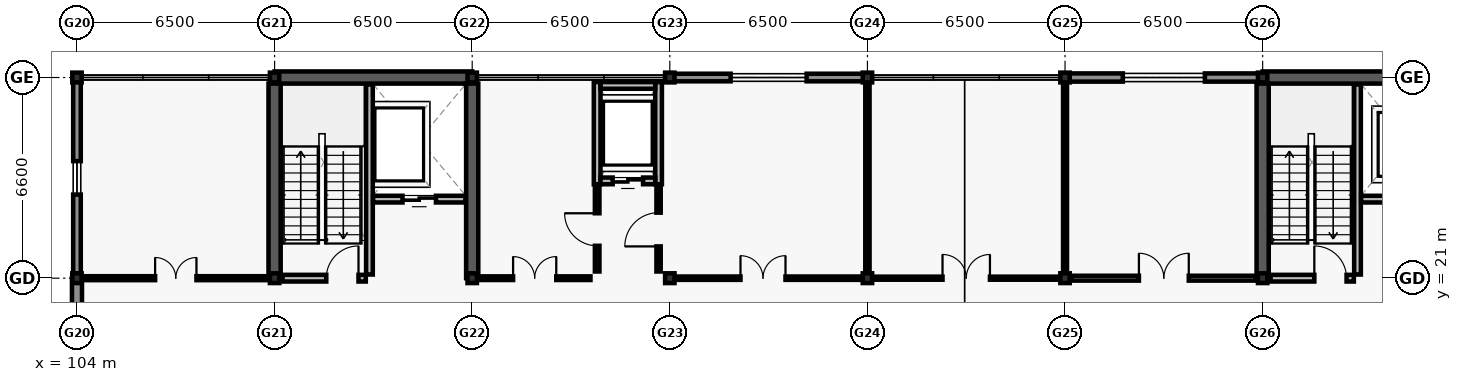
"""IFC4 building model, lengths in metres.
Left out: names, types, materials, properties, quantities, classifications, styles, units other than length and angle.
Written with IfcOpenShell. Run it as: python <this file> out.ifc"""

import sys

from ifc_helpers import new_model, si_unit, direction, frame, frame_2d, origin, origin_2d, place, context, subcontext, project, spatial, rectangle, i_section, extrude, element, fill, save


model = new_model("IFC4")
c1 = context("Model", 3, precision=1e-05, world=origin(), true_north=direction((0.0, 1.0)))
c2 = subcontext(c1, "Body", "Model", "MODEL_VIEW")
j1 = project(units=[si_unit("LENGTHUNIT", "METRE"), si_unit("PLANEANGLEUNIT", "RADIAN")], contexts=[c1])
p1 = place(None, origin())
s1 = spatial("IfcSite", under=j1, at=p1, CompositionType="ELEMENT")
p2 = place(p1, origin())
s2 = spatial("IfcBuilding", under=s1, at=p2, CompositionType="ELEMENT")
p3 = place(p2, frame((0.0, 0.0, 9.6)))
s3 = spatial("IfcBuildingStorey", under=s2, at=p3, CompositionType="ELEMENT", Elevation=9.6)
for number, where, z_axis, x_axis in (
    (1, (104.0, 21.0, 0.0), (0.0, 0.0, 1.0), (1.0, 0.0, 0.0)),
    (2, (104.0, 27.6, 0.0), (0.0, 0.0, 1.0), (1.0, 0.0, 0.0)),
    (3, (110.5, 21.0, 0.0), (0.0, 0.0, 1.0), (1.0, 0.0, 0.0)),
    (4, (110.5, 27.6, 0.0), (0.0, 0.0, 1.0), (1.0, 0.0, 0.0)),
    (5, (117.0, 21.0, 0.0), (0.0, 0.0, 1.0), (1.0, 0.0, 0.0)),
    (6, (117.0, 27.6, 0.0), (0.0, 0.0, 1.0), (1.0, 0.0, 0.0)),
    (7, (123.5, 21.0, 0.0), (0.0, 0.0, 1.0), (1.0, 0.0, 0.0)),
    (8, (123.5, 27.6, 0.0), (0.0, 0.0, 1.0), (1.0, 0.0, 0.0)),
    (9, (130.0, 21.0, 0.0), (0.0, 0.0, 1.0), (1.0, 0.0, 0.0)),
    (10, (130.0, 27.6, 0.0), (0.0, 0.0, 1.0), (1.0, 0.0, 0.0)),
    (11, (136.5, 21.0, 0.0), (0.0, 0.0, 1.0), (1.0, 0.0, 0.0)),
    (12, (136.5, 27.6, 0.0), (0.0, 0.0, 1.0), (1.0, 0.0, 0.0)),
    (13, (143.0, 21.0, 0.0), (0.0, 0.0, 1.0), (1.0, 0.0, 0.0)),
    (14, (143.0, 27.6, 0.0), (0.0, 0.0, 1.0), (1.0, 0.0, 0.0)),
):
    element("IfcColumn", number, at=place(p3, frame(where, z_axis=z_axis, x_axis=x_axis)), inside=s3, PredefinedType="COLUMN", context=c2, shape_type="SweptSolid", body=[
        extrude(i_section(OverallWidth=0.309, OverallDepth=0.321, WebThickness=0.014, FlangeThickness=0.022, FilletRadius=0.017, at=origin_2d()), origin(), (0.0, 0.0, 1.0), 3.9),
    ])
p4 = place(p3, frame((110.5, 27.6, 0.0), z_axis=(0.0, 0.0, 1.0), x_axis=(1.0, 0.0, 0.0)))
e15 = element("IfcWall", 15, at=p4, inside=s3, PredefinedType="SHEAR", context=c2, shape_type="SweptSolid", body=[
    extrude(rectangle(XDim=6.5, YDim=0.4, at=frame_2d((3.25, 0.0))), origin(), (0.0, 0.0, 1.0), 3.66),
])
for number, where, z_axis, x_axis in (
    (16, (110.5, 21.0, 0.0), (0.0, 0.0, 1.0), (0.0, 1.0, 0.0)),
    (17, (117.0, 21.0, 0.0), (0.0, 0.0, 1.0), (0.0, 1.0, 0.0)),
):
    element("IfcWall", number, at=place(p3, frame(where, z_axis=z_axis, x_axis=x_axis)), inside=s3, PredefinedType="SHEAR", context=c2, shape_type="SweptSolid", body=[
        extrude(rectangle(XDim=6.4, YDim=0.4, at=frame_2d((3.2, 0.0))), origin(), (0.0, 0.0, 1.0), 3.66),
    ])
p5 = place(p3, frame((143.0, 27.6, 0.0), z_axis=(0.0, 0.0, 1.0), x_axis=(1.0, 0.0, 0.0)))
e18 = element("IfcWall", 18, at=p5, inside=s3, PredefinedType="SHEAR", context=c2, shape_type="SweptSolid", body=[
    extrude(rectangle(XDim=6.5, YDim=0.4, at=frame_2d((3.25, 0.0))), origin(), (0.0, 0.0, 1.0), 3.66),
])
p6 = place(p3, frame((143.0, 21.0, 0.0), z_axis=(0.0, 0.0, 1.0), x_axis=(0.0, 1.0, 0.0)))
e19 = element("IfcWall", 19, at=p6, inside=s3, PredefinedType="SHEAR", context=c2, shape_type="SweptSolid", body=[
    extrude(rectangle(XDim=6.4, YDim=0.4, at=frame_2d((3.2, 0.0))), origin(), (0.0, 0.0, 1.0), 3.66),
])
p7 = place(p3, frame((123.505, 27.6, 0.0), z_axis=(0.0, 0.0, 1.0), x_axis=(1.0, 0.0, 0.0)))
e20 = element("IfcWall", 20, at=p7, inside=s3, PredefinedType="SOLIDWALL", context=c2, shape_type="SweptSolid", body=[
    extrude(rectangle(XDim=6.49, YDim=0.25, at=frame_2d((3.245, 0.0))), origin(), (0.0, 0.0, 1.0), 3.02),
])
p8 = place(p7, frame((1.995, 0.0, 0.8)))
e21 = element("IfcOpeningElement", 21, at=p8, cuts=e20, PredefinedType="OPENING", context=c2, shape_type="SweptSolid", body=[
    extrude(rectangle(XDim=2.5, YDim=1.15, at=frame_2d((1.25, 0.575))), frame((0.0, 0.135, 0.0), z_axis=(0.0, -1.0, 0.0), x_axis=(1.0, 0.0, 0.0)), (0.0, 0.0, 1.0), 0.27),
])
p9 = place(p3, frame((136.505, 27.6, 0.0), z_axis=(0.0, 0.0, 1.0), x_axis=(1.0, 0.0, 0.0)))
e22 = element("IfcWall", 22, at=p9, inside=s3, PredefinedType="SOLIDWALL", context=c2, shape_type="SweptSolid", body=[
    extrude(rectangle(XDim=6.49, YDim=0.27, at=frame_2d((3.245, 0.0))), origin(), (0.0, 0.0, 1.0), 3.02),
])
p10 = place(p9, frame((1.895, 0.0, 0.8)))
e23 = element("IfcOpeningElement", 23, at=p10, cuts=e22, PredefinedType="OPENING", context=c2, shape_type="SweptSolid", body=[
    extrude(rectangle(XDim=2.7, YDim=1.15, at=frame_2d((1.35, 0.575))), frame((0.0, 0.145, 0.0), z_axis=(0.0, -1.0, 0.0), x_axis=(1.0, 0.0, 0.0)), (0.0, 0.0, 1.0), 0.29),
])
p11 = place(p3, frame((104.0, 14.405, 0.0), z_axis=(0.0, 0.0, 1.0), x_axis=(0.0, 1.0, 0.0)))
e24 = element("IfcWall", 24, at=p11, inside=s3, PredefinedType="SOLIDWALL", context=c2, shape_type="SweptSolid", body=[
    extrude(rectangle(XDim=6.59, YDim=0.33, at=frame_2d((3.295, 0.0))), origin(), (0.0, 0.0, 1.0), 3.02),
])
p12 = place(p11, frame((0.863, 0.0, 0.8)))
e25 = element("IfcOpeningElement", 25, at=p12, cuts=e24, PredefinedType="OPENING", context=c2, shape_type="SweptSolid", body=[
    extrude(rectangle(XDim=2.1, YDim=1.25, at=frame_2d((1.05, 0.625))), frame((0.0, 0.175, 0.0), z_axis=(0.0, -1.0, 0.0), x_axis=(1.0, 0.0, 0.0)), (0.0, 0.0, 1.0), 0.35),
])
p13 = place(p3, frame((104.0, 21.005, 0.0), z_axis=(0.0, 0.0, 1.0), x_axis=(0.0, 1.0, 0.0)))
e26 = element("IfcWall", 26, at=p13, inside=s3, PredefinedType="SOLIDWALL", context=c2, shape_type="SweptSolid", body=[
    extrude(rectangle(XDim=6.59, YDim=0.25, at=frame_2d((3.295, 0.0))), origin(), (0.0, 0.0, 1.0), 3.02),
])
p14 = place(p13, frame((2.745, 0.0, 0.8)))
e27 = element("IfcOpeningElement", 27, at=p14, cuts=e26, PredefinedType="OPENING", context=c2, shape_type="SweptSolid", body=[
    extrude(rectangle(XDim=1.1, YDim=1.5, at=frame_2d((0.55, 0.75))), frame((0.0, 0.135, 0.0), z_axis=(0.0, -1.0, 0.0), x_axis=(1.0, 0.0, 0.0)), (0.0, 0.0, 1.0), 0.27),
])
p15 = place(p3, frame((113.62, 21.12, 0.0), z_axis=(0.0, 0.0, 1.0), x_axis=(0.0, 1.0, 0.0)))
e28 = element("IfcWall", 28, at=p15, inside=s3, PredefinedType="SOLIDWALL", context=c2, shape_type="SweptSolid", body=[
    extrude(rectangle(XDim=6.255, YDim=0.22, at=frame_2d((3.127, 0.0))), origin(), (0.0, 0.0, 1.0), 3.66),
])
p16 = place(p3, frame((110.76, 21.0, 0.0), z_axis=(0.0, 0.0, 1.0), x_axis=(1.0, 0.0, 0.0)))
e29 = element("IfcWall", 29, at=p16, inside=s3, PredefinedType="SOLIDWALL", context=c2, shape_type="SweptSolid", body=[
    extrude(rectangle(XDim=2.74, YDim=0.22, at=frame_2d((1.37, 0.0))), origin(), (0.0, 0.0, 1.0), 3.02),
])
p17 = place(p16, frame((1.44, 0.0, 0.0)))
e30 = element("IfcOpeningElement", 30, at=p17, cuts=e29, PredefinedType="OPENING", context=c2, shape_type="SweptSolid", body=[
    extrude(rectangle(XDim=1.06, YDim=2.1, at=frame_2d((0.53, 1.05))), frame((0.0, 0.12, 0.0), z_axis=(0.0, -1.0, 0.0), x_axis=(1.0, 0.0, 0.0)), (0.0, 0.0, 1.0), 0.24),
])
p18 = place(p3, frame((113.74, 23.6, 0.0), z_axis=(0.0, 0.0, 1.0), x_axis=(1.0, 0.0, 0.0)))
e31 = element("IfcWall", 31, at=p18, inside=s3, PredefinedType="SOLIDWALL", context=c2, shape_type="SweptSolid", body=[
    extrude(rectangle(XDim=3.035, YDim=0.22, at=frame_2d((1.518, 0.0))), origin(), (0.0, 0.0, 1.0), 3.66),
])
p19 = place(p18, frame((0.968, 0.0, 0.0)))
e32 = element("IfcOpeningElement", 32, at=p19, cuts=e31, PredefinedType="OPENING", context=c2, shape_type="SweptSolid", body=[
    extrude(rectangle(XDim=1.1, YDim=2.1, at=frame_2d((0.55, 1.05))), frame((0.0, 0.12, 0.0), z_axis=(0.0, -1.0, 0.0), x_axis=(1.0, 0.0, 0.0)), (0.0, 0.0, 1.0), 0.24),
])
for number, where, z_axis, x_axis in (
    (33, (121.11, 24.09, 0.0), (0.0, 0.0, 1.0), (0.0, 1.0, 0.0)),
    (34, (123.13, 24.09, 0.0), (0.0, 0.0, 1.0), (0.0, 1.0, 0.0)),
):
    element("IfcWall", number, at=place(p3, frame(where, z_axis=z_axis, x_axis=x_axis)), inside=s3, PredefinedType="SOLIDWALL", context=c2, shape_type="SweptSolid", body=[
        extrude(rectangle(XDim=3.36, YDim=0.22, at=frame_2d((1.68, 0.0))), origin(), (0.0, 0.0, 1.0), 3.66),
    ])
p20 = place(p3, frame((121.22, 27.34, 0.0), z_axis=(0.0, 0.0, 1.0), x_axis=(1.0, 0.0, 0.0)))
e35 = element("IfcWall", 35, at=p20, inside=s3, PredefinedType="SOLIDWALL", context=c2, shape_type="SweptSolid", body=[
    extrude(rectangle(XDim=1.8, YDim=0.22, at=frame_2d((0.9, 0.0))), origin(), (0.0, 0.0, 1.0), 3.66),
])
p21 = place(p3, frame((121.22, 24.2, 0.0), z_axis=(0.0, 0.0, 1.0), x_axis=(1.0, 0.0, 0.0)))
e36 = element("IfcWall", 36, at=p21, inside=s3, PredefinedType="SOLIDWALL", context=c2, shape_type="SweptSolid", body=[
    extrude(rectangle(XDim=1.8, YDim=0.22, at=frame_2d((0.9, 0.0))), origin(), (0.0, 0.0, 1.0), 3.66),
])
p22 = place(p21, frame((0.4, 0.0, 0.0)))
e37 = element("IfcOpeningElement", 37, at=p22, cuts=e36, PredefinedType="OPENING", context=c2, shape_type="SweptSolid", body=[
    extrude(rectangle(XDim=1.0, YDim=2.1, at=frame_2d((0.5, 1.05))), frame((0.0, 0.12, 0.0), z_axis=(0.0, -1.0, 0.0), x_axis=(1.0, 0.0, 0.0)), (0.0, 0.0, 1.0), 0.24),
])
p23 = place(p3, frame((146.12, 21.12, 0.0), z_axis=(0.0, 0.0, 1.0), x_axis=(0.0, 1.0, 0.0)))
e38 = element("IfcWall", 38, at=p23, inside=s3, PredefinedType="SOLIDWALL", context=c2, shape_type="SweptSolid", body=[
    extrude(rectangle(XDim=6.255, YDim=0.22, at=frame_2d((3.127, 0.0))), origin(), (0.0, 0.0, 1.0), 3.66),
])
p24 = place(p3, frame((143.26, 21.0, 0.0), z_axis=(0.0, 0.0, 1.0), x_axis=(1.0, 0.0, 0.0)))
e39 = element("IfcWall", 39, at=p24, inside=s3, PredefinedType="SOLIDWALL", context=c2, shape_type="SweptSolid", body=[
    extrude(rectangle(XDim=2.74, YDim=0.22, at=frame_2d((1.37, 0.0))), origin(), (0.0, 0.0, 1.0), 3.02),
])
p25 = place(p24, frame((1.44, 0.0, 0.0)))
e40 = element("IfcOpeningElement", 40, at=p25, cuts=e39, PredefinedType="OPENING", context=c2, shape_type="SweptSolid", body=[
    extrude(rectangle(XDim=1.06, YDim=2.1, at=frame_2d((0.53, 1.05))), frame((0.0, 0.12, 0.0), z_axis=(0.0, -1.0, 0.0), x_axis=(1.0, 0.0, 0.0)), (0.0, 0.0, 1.0), 0.24),
])
p26 = place(p3, frame((146.24, 23.6, 0.0), z_axis=(0.0, 0.0, 1.0), x_axis=(1.0, 0.0, 0.0)))
e41 = element("IfcWall", 41, at=p26, inside=s3, PredefinedType="SOLIDWALL", context=c2, shape_type="SweptSolid", body=[
    extrude(rectangle(XDim=3.035, YDim=0.22, at=frame_2d((1.518, 0.0))), origin(), (0.0, 0.0, 1.0), 3.66),
])
p27 = place(p26, frame((0.917, 0.0, 0.0)))
e42 = element("IfcOpeningElement", 42, at=p27, cuts=e41, PredefinedType="OPENING", context=c2, shape_type="SweptSolid", body=[
    extrude(rectangle(XDim=1.2, YDim=2.15, at=frame_2d((0.6, 1.075))), frame((0.0, 0.12, 0.0), z_axis=(0.0, -1.0, 0.0), x_axis=(1.0, 0.0, 0.0)), (0.0, 0.0, 1.0), 0.24),
])
p28 = place(p3, frame((121.11, 21.22, 0.0), z_axis=(0.0, 0.0, 1.0), x_axis=(0.0, 1.0, 0.0)))
e43 = element("IfcWall", 43, at=p28, inside=s3, PredefinedType="PARTITIONING", context=c2, shape_type="SweptSolid", body=[
    extrude(rectangle(XDim=2.76, YDim=0.15, at=frame_2d((1.38, 0.0))), origin(), (0.0, 0.0, 1.0), 3.0),
])
p29 = place(p28, frame((0.845, 0.0, 0.0)))
e44 = element("IfcOpeningElement", 44, at=p29, cuts=e43, PredefinedType="OPENING", context=c2, shape_type="SweptSolid", body=[
    extrude(rectangle(XDim=1.07, YDim=2.08, at=frame_2d((0.535, 1.04))), frame((0.0, 0.085, 0.0), z_axis=(0.0, -1.0, 0.0), x_axis=(1.0, 0.0, 0.0)), (0.0, 0.0, 1.0), 0.17),
])
p30 = place(p3, frame((123.13, 21.22, 0.0), z_axis=(0.0, 0.0, 1.0), x_axis=(0.0, 1.0, 0.0)))
e45 = element("IfcWall", 45, at=p30, inside=s3, PredefinedType="PARTITIONING", context=c2, shape_type="SweptSolid", body=[
    extrude(rectangle(XDim=2.76, YDim=0.14, at=frame_2d((1.38, 0.0))), origin(), (0.0, 0.0, 1.0), 3.0),
])
p31 = place(p30, frame((0.825, 0.0, 0.0)))
e46 = element("IfcOpeningElement", 46, at=p31, cuts=e45, PredefinedType="OPENING", context=c2, shape_type="SweptSolid", body=[
    extrude(rectangle(XDim=1.11, YDim=2.1, at=frame_2d((0.555, 1.05))), frame((0.0, 0.08, 0.0), z_axis=(0.0, -1.0, 0.0), x_axis=(1.0, 0.0, 0.0)), (0.0, 0.0, 1.0), 0.16),
])
p32 = place(p3, frame((104.22, 21.0, 0.0), z_axis=(0.0, 0.0, 1.0), x_axis=(1.0, 0.0, 0.0)))
e47 = element("IfcWall", 47, at=p32, inside=s3, PredefinedType="PARTITIONING", context=c2, shape_type="SweptSolid", body=[
    extrude(rectangle(XDim=6.06, YDim=0.13, at=frame_2d((3.03, 0.0))), origin(), (0.0, 0.0, 1.0), 3.0),
])
p33 = place(p32, frame((2.35, 0.0, 0.0)))
e48 = element("IfcOpeningElement", 48, at=p33, cuts=e47, PredefinedType="OPENING", context=c2, shape_type="SweptSolid", body=[
    extrude(rectangle(XDim=1.36, YDim=2.15, at=frame_2d((0.68, 1.075))), frame((0.0, 0.075, 0.0), z_axis=(0.0, -1.0, 0.0), x_axis=(1.0, 0.0, 0.0)), (0.0, 0.0, 1.0), 0.15),
])
p34 = place(p3, frame((117.22, 21.0, 0.0), z_axis=(0.0, 0.0, 1.0), x_axis=(1.0, 0.0, 0.0)))
e49 = element("IfcWall", 49, at=p34, inside=s3, PredefinedType="PARTITIONING", context=c2, shape_type="SweptSolid", body=[
    extrude(rectangle(XDim=3.67, YDim=0.12, at=frame_2d((1.835, 0.0))), origin(), (0.0, 0.0, 1.0), 3.0),
])
p35 = place(p34, frame((1.125, 0.0, 0.0)))
e50 = element("IfcOpeningElement", 50, at=p35, cuts=e49, PredefinedType="OPENING", context=c2, shape_type="SweptSolid", body=[
    extrude(rectangle(XDim=1.42, YDim=2.15, at=frame_2d((0.71, 1.075))), frame((0.0, 0.07, 0.0), z_axis=(0.0, -1.0, 0.0), x_axis=(1.0, 0.0, 0.0)), (0.0, 0.0, 1.0), 0.14),
])
p36 = place(p3, frame((123.35, 21.0, 0.0), z_axis=(0.0, 0.0, 1.0), x_axis=(1.0, 0.0, 0.0)))
e51 = element("IfcWall", 51, at=p36, inside=s3, PredefinedType="PARTITIONING", context=c2, shape_type="SweptSolid", body=[
    extrude(rectangle(XDim=6.43, YDim=0.11, at=frame_2d((3.215, 0.0))), origin(), (0.0, 0.0, 1.0), 3.0),
])
p37 = place(p36, frame((2.475, 0.0, 0.0)))
e52 = element("IfcOpeningElement", 52, at=p37, cuts=e51, PredefinedType="OPENING", context=c2, shape_type="SweptSolid", body=[
    extrude(rectangle(XDim=1.48, YDim=2.18, at=frame_2d((0.74, 1.09))), frame((0.0, 0.065, 0.0), z_axis=(0.0, -1.0, 0.0), x_axis=(1.0, 0.0, 0.0)), (0.0, 0.0, 1.0), 0.13),
])
p38 = place(p3, frame((130.22, 21.0, 0.0), z_axis=(0.0, 0.0, 1.0), x_axis=(1.0, 0.0, 0.0)))
e53 = element("IfcWall", 53, at=p38, inside=s3, PredefinedType="PARTITIONING", context=c2, shape_type="SweptSolid", body=[
    extrude(rectangle(XDim=6.06, YDim=0.1, at=frame_2d((3.03, 0.0))), origin(), (0.0, 0.0, 1.0), 3.0),
])
p39 = place(p38, frame((2.25, 0.0, 0.0)))
e54 = element("IfcOpeningElement", 54, at=p39, cuts=e53, PredefinedType="OPENING", context=c2, shape_type="SweptSolid", body=[
    extrude(rectangle(XDim=1.56, YDim=2.18, at=frame_2d((0.78, 1.09))), frame((0.0, 0.06, 0.0), z_axis=(0.0, -1.0, 0.0), x_axis=(1.0, 0.0, 0.0)), (0.0, 0.0, 1.0), 0.12),
])
p40 = place(p3, frame((136.72, 21.0, 0.0), z_axis=(0.0, 0.0, 1.0), x_axis=(1.0, 0.0, 0.0)))
e55 = element("IfcWall", 55, at=p40, inside=s3, PredefinedType="PARTITIONING", context=c2, shape_type="SweptSolid", body=[
    extrude(rectangle(XDim=6.06, YDim=0.16, at=frame_2d((3.03, 0.0))), origin(), (0.0, 0.0, 1.0), 3.0),
])
p41 = place(p40, frame((2.21, 0.0, 0.0)))
e56 = element("IfcOpeningElement", 56, at=p41, cuts=e55, PredefinedType="OPENING", context=c2, shape_type="SweptSolid", body=[
    extrude(rectangle(XDim=1.64, YDim=2.2, at=frame_2d((0.82, 1.1))), frame((0.0, 0.09, 0.0), z_axis=(0.0, -1.0, 0.0), x_axis=(1.0, 0.0, 0.0)), (0.0, 0.0, 1.0), 0.18),
])
p42 = place(p3, frame((130.0, 21.22, 0.0), z_axis=(0.0, 0.0, 1.0), x_axis=(0.0, 1.0, 0.0)))
e57 = element("IfcWall", 57, at=p42, inside=s3, PredefinedType="PARTITIONING", context=c2, shape_type="SweptSolid", body=[
    extrude(rectangle(XDim=6.16, YDim=0.14, at=frame_2d((3.08, 0.0))), origin(), (0.0, 0.0, 1.0), 3.0),
])
p43 = place(p3, frame((136.5, 21.22, 0.0), z_axis=(0.0, 0.0, 1.0), x_axis=(0.0, 1.0, 0.0)))
e58 = element("IfcWall", 58, at=p43, inside=s3, PredefinedType="PARTITIONING", context=c2, shape_type="SweptSolid", body=[
    extrude(rectangle(XDim=6.16, YDim=0.13, at=frame_2d((3.08, 0.0))), origin(), (0.0, 0.0, 1.0), 3.0),
])
p44 = place(p8, origin())
e59 = element("IfcWindow", 59, at=p44, inside=s3, PartitioningType="TRIPLE_PANEL_VERTICAL", PredefinedType="WINDOW", context=c2, shape_type="SweptSolid", body=[
    extrude(rectangle(XDim=2.5, YDim=1.15, at=frame_2d((1.25, 0.575))), frame((0.0, 0.03, 0.0), z_axis=(0.0, -1.0, 0.0), x_axis=(1.0, 0.0, 0.0)), (0.0, 0.0, 1.0), 0.06),
])
fill(e21, e59)
p45 = place(p10, origin())
e60 = element("IfcWindow", 60, at=p45, inside=s3, PartitioningType="TRIPLE_PANEL_VERTICAL", PredefinedType="WINDOW", context=c2, shape_type="SweptSolid", body=[
    extrude(rectangle(XDim=2.7, YDim=1.15, at=frame_2d((1.35, 0.575))), frame((0.0, 0.03, 0.0), z_axis=(0.0, -1.0, 0.0), x_axis=(1.0, 0.0, 0.0)), (0.0, 0.0, 1.0), 0.06),
])
fill(e23, e60)
p46 = place(p14, origin())
e61 = element("IfcWindow", 61, at=p46, inside=s3, PartitioningType="SINGLE_PANEL", PredefinedType="WINDOW", context=c2, shape_type="SweptSolid", body=[
    extrude(rectangle(XDim=1.1, YDim=1.5, at=frame_2d((0.55, 0.75))), frame((0.0, 0.03, 0.0), z_axis=(0.0, -1.0, 0.0), x_axis=(1.0, 0.0, 0.0)), (0.0, 0.0, 1.0), 0.06),
])
fill(e27, e61)
p47 = place(p17, origin())
e62 = element("IfcDoor", 62, at=p47, inside=s3, OperationType="SINGLE_SWING_RIGHT", PredefinedType="DOOR", context=c2, shape_type="SweptSolid", body=[
    extrude(rectangle(XDim=1.06, YDim=2.1, at=frame_2d((0.53, 1.05))), frame((0.0, 0.025, 0.0), z_axis=(0.0, -1.0, 0.0), x_axis=(1.0, 0.0, 0.0)), (0.0, 0.0, 1.0), 0.05),
])
fill(e30, e62)
p48 = place(p19, origin())
e63 = element("IfcDoor", 63, at=p48, inside=s3, OperationType="DOUBLE_DOOR_SLIDING", PredefinedType="DOOR", context=c2, shape_type="SweptSolid", body=[
    extrude(rectangle(XDim=1.1, YDim=2.1, at=frame_2d((0.55, 1.05))), frame((0.0, 0.025, 0.0), z_axis=(0.0, -1.0, 0.0), x_axis=(1.0, 0.0, 0.0)), (0.0, 0.0, 1.0), 0.05),
])
fill(e32, e63)
p49 = place(p22, origin())
e64 = element("IfcDoor", 64, at=p49, inside=s3, OperationType="DOUBLE_DOOR_SLIDING", PredefinedType="DOOR", context=c2, shape_type="SweptSolid", body=[
    extrude(rectangle(XDim=1.0, YDim=2.1, at=frame_2d((0.5, 1.05))), frame((0.0, 0.025, 0.0), z_axis=(0.0, -1.0, 0.0), x_axis=(1.0, 0.0, 0.0)), (0.0, 0.0, 1.0), 0.05),
])
fill(e37, e64)
p50 = place(p25, origin())
e65 = element("IfcDoor", 65, at=p50, inside=s3, OperationType="SINGLE_SWING_LEFT", PredefinedType="DOOR", context=c2, shape_type="SweptSolid", body=[
    extrude(rectangle(XDim=1.06, YDim=2.1, at=frame_2d((0.53, 1.05))), frame((0.0, 0.025, 0.0), z_axis=(0.0, -1.0, 0.0), x_axis=(1.0, 0.0, 0.0)), (0.0, 0.0, 1.0), 0.05),
])
fill(e40, e65)
p51 = place(p29, origin())
e66 = element("IfcDoor", 66, at=p51, inside=s3, OperationType="SINGLE_SWING_RIGHT", PredefinedType="DOOR", context=c2, shape_type="SweptSolid", body=[
    extrude(rectangle(XDim=1.07, YDim=2.08, at=frame_2d((0.535, 1.04))), frame((0.0, 0.025, 0.0), z_axis=(0.0, -1.0, 0.0), x_axis=(1.0, 0.0, 0.0)), (0.0, 0.0, 1.0), 0.05),
])
fill(e44, e66)
p52 = place(p31, origin())
e67 = element("IfcDoor", 67, at=p52, inside=s3, OperationType="SINGLE_SWING_LEFT", PredefinedType="DOOR", context=c2, shape_type="SweptSolid", body=[
    extrude(rectangle(XDim=1.11, YDim=2.1, at=frame_2d((0.555, 1.05))), frame((0.0, 0.025, 0.0), z_axis=(0.0, -1.0, 0.0), x_axis=(1.0, 0.0, 0.0)), (0.0, 0.0, 1.0), 0.05),
])
fill(e46, e67)
p53 = place(p33, origin())
e68 = element("IfcDoor", 68, at=p53, inside=s3, OperationType="DOUBLE_DOOR_SINGLE_SWING", PredefinedType="DOOR", context=c2, shape_type="SweptSolid", body=[
    extrude(rectangle(XDim=1.36, YDim=2.15, at=frame_2d((0.68, 1.075))), frame((0.0, 0.025, 0.0), z_axis=(0.0, -1.0, 0.0), x_axis=(1.0, 0.0, 0.0)), (0.0, 0.0, 1.0), 0.05),
])
fill(e48, e68)
p54 = place(p35, origin())
e69 = element("IfcDoor", 69, at=p54, inside=s3, OperationType="DOUBLE_DOOR_SINGLE_SWING", PredefinedType="DOOR", context=c2, shape_type="SweptSolid", body=[
    extrude(rectangle(XDim=1.42, YDim=2.15, at=frame_2d((0.71, 1.075))), frame((0.0, 0.025, 0.0), z_axis=(0.0, -1.0, 0.0), x_axis=(1.0, 0.0, 0.0)), (0.0, 0.0, 1.0), 0.05),
])
fill(e50, e69)
p55 = place(p37, origin())
e70 = element("IfcDoor", 70, at=p55, inside=s3, OperationType="DOUBLE_DOOR_SINGLE_SWING", PredefinedType="DOOR", context=c2, shape_type="SweptSolid", body=[
    extrude(rectangle(XDim=1.48, YDim=2.18, at=frame_2d((0.74, 1.09))), frame((0.0, 0.025, 0.0), z_axis=(0.0, -1.0, 0.0), x_axis=(1.0, 0.0, 0.0)), (0.0, 0.0, 1.0), 0.05),
])
fill(e52, e70)
p56 = place(p39, origin())
e71 = element("IfcDoor", 71, at=p56, inside=s3, OperationType="DOUBLE_DOOR_SINGLE_SWING", PredefinedType="DOOR", context=c2, shape_type="SweptSolid", body=[
    extrude(rectangle(XDim=1.56, YDim=2.18, at=frame_2d((0.78, 1.09))), frame((0.0, 0.025, 0.0), z_axis=(0.0, -1.0, 0.0), x_axis=(1.0, 0.0, 0.0)), (0.0, 0.0, 1.0), 0.05),
])
fill(e54, e71)
p57 = place(p41, origin())
e72 = element("IfcDoor", 72, at=p57, inside=s3, OperationType="DOUBLE_DOOR_SINGLE_SWING", PredefinedType="DOOR", context=c2, shape_type="SweptSolid", body=[
    extrude(rectangle(XDim=1.64, YDim=2.2, at=frame_2d((0.82, 1.1))), frame((0.0, 0.025, 0.0), z_axis=(0.0, -1.0, 0.0), x_axis=(1.0, 0.0, 0.0)), (0.0, 0.0, 1.0), 0.05),
])
fill(e56, e72)
save(model, sys.argv[1])
